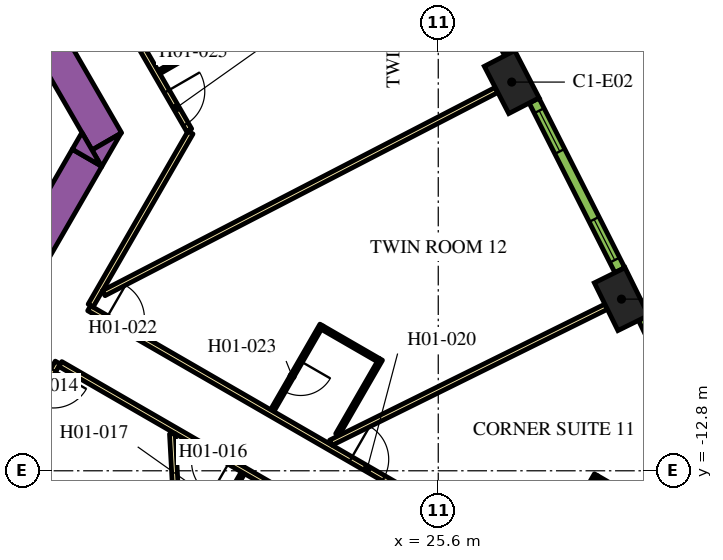
"""IFC4 building model, lengths in metres.
Left out: names, types, materials, properties, quantities, classifications, styles, units other than length and angle.
Written with IfcOpenShell. Run it as: python <this file> out.ifc"""

import sys

from ifc_helpers import new_model, si_unit, direction, frame, frame_2d, origin, origin_2d, place, context, subcontext, project, spatial, polyline, rectangle, outline, extrude, element, fill, save


model = new_model("IFC4")
c1 = context("Model", 3, precision=1e-05, world=origin(), true_north=direction((0.0, 1.0)))
c2 = subcontext(c1, "Body", "Model", "MODEL_VIEW")
j1 = project(units=[si_unit("LENGTHUNIT", "METRE"), si_unit("PLANEANGLEUNIT", "RADIAN")], contexts=[c1])
p1 = place(None, origin())
s1 = spatial("IfcSite", under=j1, at=p1, CompositionType="ELEMENT")
p2 = place(p1, origin())
s2 = spatial("IfcBuilding", under=s1, at=p2, CompositionType="ELEMENT")
p3 = place(p2, frame((0.0, 0.0, 35.4)))
s3 = spatial("IfcBuildingStorey", under=s2, at=p3, CompositionType="ELEMENT", Elevation=35.4)
for number, where, z_axis, x_axis in (
    (1, (30.421, -8.284, 0.0), (0.0, 0.0, 1.0), (-0.443, 0.897, 0.0)),
    (2, (27.533, -2.572, 0.0), (0.0, 0.0, 1.0), (-0.459, 0.888, 0.0)),
):
    element("IfcColumn", number, at=place(p3, frame(where, z_axis=z_axis, x_axis=x_axis)), inside=s3, PredefinedType="COLUMN", context=c2, shape_type="SweptSolid", body=[
        extrude(rectangle(XDim=1.4, YDim=0.9, at=origin_2d()), origin(), (0.0, 0.0, 1.0), 3.9),
    ])
p4 = place(p3, frame((6.711, 13.476, 0.0), z_axis=(0.0, 0.0, 1.0), x_axis=(0.500002723396, -0.866023831425, 0.0)))
e3 = element("IfcWall", 3, at=p4, inside=s3, PredefinedType="SOLIDWALL", context=c2, shape_type="SweptSolid", body=[
    extrude(rectangle(XDim=20.334, YDim=0.9, at=frame_2d((10.167, 0.0))), origin(), (0.0, 0.0, 1.0), 3.9),
])
p5 = place(p3, origin())
e4 = element("IfcWall", 4, at=p5, inside=s3, PredefinedType="SOLIDWALL", context=c2, shape_type="SweptSolid", body=[
    extrude(outline(polyline([(16.743, -4.8), (16.489, -4.36), (17.251, -3.92), (16.743, -4.8)])), origin(), (0.0, 0.0, 1.0), 3.9),
])
p6 = place(p3, frame((11.695, -12.644, 0.0), z_axis=(0.0, 0.0, 1.0), x_axis=(0.500010229568, 0.86601949766, 0.0)))
e5 = element("IfcWall", 5, at=p6, inside=s3, PredefinedType="SOLIDWALL", context=c2, shape_type="SweptSolid", body=[
    extrude(rectangle(XDim=9.326, YDim=0.9, at=frame_2d((4.663, 0.0))), origin(), (0.0, 0.0, 1.0), 3.9),
])
e6 = element("IfcWall", 6, at=p5, inside=s3, PredefinedType="SOLIDWALL", context=c2, shape_type="SweptSolid", body=[
    extrude(outline(polyline([(16.223, -3.9), (16.732, -4.78), (15.969, -4.34), (16.223, -3.9)])), origin(), (0.0, 0.0, 1.0), 3.9),
])
p7 = place(p3, frame((16.412, -8.523, 0.0), z_axis=(0.0, 0.0, 1.0), x_axis=(0.866022197818, -0.500005552856, 0.0)))
e7 = element("IfcWall", 7, at=p7, inside=s3, PredefinedType="PARTITIONING", context=c2, shape_type="SweptSolid", body=[
    extrude(rectangle(XDim=16.224, YDim=0.15, at=frame_2d((8.112, 0.0))), origin(), (0.0, 0.0, 1.0), 2.75),
])
p8 = place(p7, frame((7.949, 0.0, 0.0)))
e8 = element("IfcOpeningElement", 8, at=p8, cuts=e7, PredefinedType="OPENING", context=c2, shape_type="SweptSolid", body=[
    extrude(rectangle(XDim=1.0, YDim=2.1, at=frame_2d((0.5, 1.05))), frame((0.0, 0.085, 0.0), z_axis=(0.0, -1.0, 0.0), x_axis=(1.0, 0.0, 0.0)), (0.0, 0.0, 1.0), 0.17),
])
p9 = place(p7, frame((0.526, 0.0, 0.0)))
e9 = element("IfcOpeningElement", 9, at=p9, cuts=e7, PredefinedType="OPENING", context=c2, shape_type="SweptSolid", body=[
    extrude(rectangle(XDim=1.0, YDim=2.1, at=frame_2d((0.5, 1.05))), frame((0.0, 0.085, 0.0), z_axis=(0.0, -1.0, 0.0), x_axis=(1.0, 0.0, 0.0)), (0.0, 0.0, 1.0), 0.17),
])
p10 = place(p3, frame((19.081, -3.9, 0.0), z_axis=(0.0, 0.0, 1.0), x_axis=(-0.499974327079, -0.866040225545, 0.0)))
e10 = element("IfcWall", 10, at=p10, inside=s3, PredefinedType="PARTITIONING", context=c2, shape_type="SweptSolid", body=[
    extrude(rectangle(XDim=5.258, YDim=0.15, at=frame_2d((2.629, 0.0))), origin(), (0.0, 0.0, 1.0), 2.75),
])
p11 = place(p3, frame((6.163, 18.475, 0.0), z_axis=(0.0, 0.0, 1.0), x_axis=(0.500001317485, -0.866024643133, 0.0)))
e11 = element("IfcWall", 11, at=p11, inside=s3, PredefinedType="PARTITIONING", context=c2, shape_type="SweptSolid", body=[
    extrude(rectangle(XDim=25.767, YDim=0.15, at=frame_2d((12.883, 0.0))), origin(), (0.0, 0.0, 1.0), 2.75),
])
p12 = place(p11, frame((24.586, 0.0, 0.0)))
e12 = element("IfcOpeningElement", 12, at=p12, cuts=e11, PredefinedType="OPENING", context=c2, shape_type="SweptSolid", body=[
    extrude(rectangle(XDim=1.0, YDim=2.1, at=frame_2d((0.5, 1.05))), frame((0.0, 0.085, 0.0), z_axis=(0.0, -1.0, 0.0), x_axis=(1.0, 0.0, 0.0)), (0.0, 0.0, 1.0), 0.17),
])
p13 = place(p11, frame((19.319, 0.0, 0.0)))
e13 = element("IfcOpeningElement", 13, at=p13, cuts=e11, PredefinedType="OPENING", context=c2, shape_type="SweptSolid", body=[
    extrude(rectangle(XDim=1.0, YDim=2.1, at=frame_2d((0.5, 1.05))), frame((0.0, 0.085, 0.0), z_axis=(0.0, -1.0, 0.0), x_axis=(1.0, 0.0, 0.0)), (0.0, 0.0, 1.0), 0.17),
])
p14 = place(p11, frame((18.012, 0.0, 0.0)))
e14 = element("IfcOpeningElement", 14, at=p14, cuts=e11, PredefinedType="OPENING", context=c2, shape_type="SweptSolid", body=[
    extrude(rectangle(XDim=1.0, YDim=2.1, at=frame_2d((0.5, 1.05))), frame((0.0, 0.085, 0.0), z_axis=(0.0, -1.0, 0.0), x_axis=(1.0, 0.0, 0.0)), (0.0, 0.0, 1.0), 0.17),
])
p15 = place(p11, frame((6.824, 0.0, 0.0)))
e15 = element("IfcOpeningElement", 15, at=p15, cuts=e11, PredefinedType="OPENING", context=c2, shape_type="SweptSolid", body=[
    extrude(rectangle(XDim=1.1, YDim=2.1, at=frame_2d((0.55, 1.05))), frame((0.0, 0.085, 0.0), z_axis=(0.0, -1.0, 0.0), x_axis=(1.0, 0.0, 0.0)), (0.0, 0.0, 1.0), 0.17),
])
p16 = place(p11, frame((4.658, 0.0, 0.0)))
e16 = element("IfcOpeningElement", 16, at=p16, cuts=e11, PredefinedType="OPENING", context=c2, shape_type="SweptSolid", body=[
    extrude(rectangle(XDim=0.9, YDim=2.1, at=frame_2d((0.45, 1.05))), frame((0.0, 0.085, 0.0), z_axis=(0.0, -1.0, 0.0), x_axis=(1.0, 0.0, 0.0)), (0.0, 0.0, 1.0), 0.17),
])
p17 = place(p11, frame((0.18, 0.0, 0.0)))
e17 = element("IfcOpeningElement", 17, at=p17, cuts=e11, PredefinedType="OPENING", context=c2, shape_type="SweptSolid", body=[
    extrude(rectangle(XDim=1.0, YDim=2.1, at=frame_2d((0.5, 1.05))), frame((0.0, 0.085, 0.0), z_axis=(0.0, -1.0, 0.0), x_axis=(1.0, 0.0, 0.0)), (0.0, 0.0, 1.0), 0.17),
])
p18 = place(p3, frame((15.587, -9.952, 0.0), z_axis=(0.0, 0.0, 1.0), x_axis=(-0.500016618951, -0.866015808616, 0.0)))
e18 = element("IfcWall", 18, at=p18, inside=s3, PredefinedType="PARTITIONING", context=c2, shape_type="SweptSolid", body=[
    extrude(rectangle(XDim=5.268, YDim=0.15, at=frame_2d((2.634, 0.0))), origin(), (0.0, 0.0, 1.0), 2.75),
])
p19 = place(p18, frame((0.225, 0.0, 0.0)))
e19 = element("IfcOpeningElement", 19, at=p19, cuts=e18, PredefinedType="OPENING", context=c2, shape_type="SweptSolid", body=[
    extrude(rectangle(XDim=1.0, YDim=2.1, at=frame_2d((0.5, 1.05))), frame((0.0, 0.085, 0.0), z_axis=(0.0, -1.0, 0.0), x_axis=(1.0, 0.0, 0.0)), (0.0, 0.0, 1.0), 0.17),
])
p20 = place(p3, frame((29.638, -18.064, 0.0), z_axis=(0.0, 0.0, 1.0), x_axis=(-0.866026175601, 0.499998663172, 0.0)))
e20 = element("IfcWall", 20, at=p20, inside=s3, PredefinedType="PARTITIONING", context=c2, shape_type="SweptSolid", body=[
    extrude(rectangle(XDim=16.144, YDim=0.15, at=frame_2d((8.072, 0.0))), origin(), (0.0, 0.0, 1.0), 2.75),
])
p21 = place(p20, frame((11.004, 0.0, 0.0)))
e21 = element("IfcOpeningElement", 21, at=p21, cuts=e20, PredefinedType="OPENING", context=c2, shape_type="SweptSolid", body=[
    extrude(rectangle(XDim=1.0, YDim=2.1, at=frame_2d((0.5, 1.05))), frame((0.0, 0.085, 0.0), z_axis=(0.0, -1.0, 0.0), x_axis=(1.0, 0.0, 0.0)), (0.0, 0.0, 1.0), 0.17),
])
p22 = place(p20, frame((7.275, 0.0, 0.0)))
e22 = element("IfcOpeningElement", 22, at=p22, cuts=e20, PredefinedType="OPENING", context=c2, shape_type="SweptSolid", body=[
    extrude(rectangle(XDim=1.0, YDim=2.1, at=frame_2d((0.5, 1.05))), frame((0.0, 0.085, 0.0), z_axis=(0.0, -1.0, 0.0), x_axis=(1.0, 0.0, 0.0)), (0.0, 0.0, 1.0), 0.17),
])
p23 = place(p3, frame((27.134, -2.779, 0.0), z_axis=(0.0, 0.0, 1.0), x_axis=(-0.8882049501, -0.459447457951, 0.0)))
e23 = element("IfcWall", 23, at=p23, inside=s3, PredefinedType="PARTITIONING", context=c2, shape_type="SweptSolid", body=[
    extrude(rectangle(XDim=11.638, YDim=0.15, at=frame_2d((5.819, 0.0))), origin(), (0.0, 0.0, 1.0), 2.75),
])
p24 = place(p3, frame((19.198, -22.541, 0.0), z_axis=(0.0, 0.0, 1.0), x_axis=(-0.055432210572, 0.99846245299, 0.0)))
e24 = element("IfcWall", 24, at=p24, inside=s3, PredefinedType="PARTITIONING", context=c2, shape_type="SweptSolid", body=[
    extrude(rectangle(XDim=10.729, YDim=0.15, at=frame_2d((5.365, 0.0))), origin(), (0.0, 0.0, 1.0), 2.75),
])
p25 = place(p3, frame((30.018, -8.483, 0.0), z_axis=(0.0, 0.0, 1.0), x_axis=(-0.896544505264, -0.44295366584, 0.0)))
e25 = element("IfcWall", 25, at=p25, inside=s3, PredefinedType="PARTITIONING", context=c2, shape_type="SweptSolid", body=[
    extrude(rectangle(XDim=8.079, YDim=0.15, at=frame_2d((4.04, 0.0))), origin(), (0.0, 0.0, 1.0), 2.75),
])
p26 = place(p3, frame((16.16, -14.31, 0.0), z_axis=(0.0, 0.0, 1.0), x_axis=(-0.866062058628, 0.499936506574, 0.0)))
e26 = element("IfcWall", 26, at=p26, inside=s3, PredefinedType="PARTITIONING", context=c2, shape_type="SweptSolid", body=[
    extrude(rectangle(XDim=2.6, YDim=0.1, at=frame_2d((1.3, 0.0))), origin(), (0.0, 0.0, 1.0), 2.75),
])
p27 = place(p26, frame((1.1, 0.0, 0.0)))
e27 = element("IfcOpeningElement", 27, at=p27, cuts=e26, PredefinedType="OPENING", context=c2, shape_type="SweptSolid", body=[
    extrude(rectangle(XDim=0.9, YDim=2.1, at=frame_2d((0.45, 1.05))), frame((0.0, 0.06, 0.0), z_axis=(0.0, -1.0, 0.0), x_axis=(1.0, 0.0, 0.0)), (0.0, 0.0, 1.0), 0.12),
])
p28 = place(p3, frame((20.461, -12.852, 0.0), z_axis=(0.0, 0.0, 1.0), x_axis=(-0.49997559174, -0.866039495442, 0.0)))
e28 = element("IfcWall", 28, at=p28, inside=s3, PredefinedType="PARTITIONING", context=c2, shape_type="SweptSolid", body=[
    extrude(rectangle(XDim=2.95, YDim=0.1, at=frame_2d((1.475, 0.0))), origin(), (0.0, 0.0, 1.0), 2.75),
])
p29 = place(p28, frame((0.6, 0.0, 0.0)))
e29 = element("IfcOpeningElement", 29, at=p29, cuts=e28, PredefinedType="OPENING", context=c2, shape_type="SweptSolid", body=[
    extrude(rectangle(XDim=0.9, YDim=2.1, at=frame_2d((0.45, 1.05))), frame((0.0, 0.06, 0.0), z_axis=(0.0, -1.0, 0.0), x_axis=(1.0, 0.0, 0.0)), (0.0, 0.0, 1.0), 0.12),
])
p30 = place(p3, frame((29.752, -12.905, 0.0), z_axis=(0.0, 0.0, 1.0), x_axis=(-0.500049511043, -0.865996816683, 0.0)))
e30 = element("IfcWall", 30, at=p30, inside=s3, PredefinedType="PARTITIONING", context=c2, shape_type="SweptSolid", body=[
    extrude(rectangle(XDim=2.8, YDim=0.1, at=frame_2d((1.4, 0.0))), origin(), (0.0, 0.0, 1.0), 2.75),
])
p31 = place(p30, frame((1.3, 0.0, 0.0)))
e31 = element("IfcOpeningElement", 31, at=p31, cuts=e30, PredefinedType="OPENING", context=c2, shape_type="SweptSolid", body=[
    extrude(rectangle(XDim=0.9, YDim=2.1, at=frame_2d((0.45, 1.05))), frame((0.0, 0.06, 0.0), z_axis=(0.0, -1.0, 0.0), x_axis=(1.0, 0.0, 0.0)), (0.0, 0.0, 1.0), 0.12),
])
p32 = place(p3, frame((29.771, -12.973, 0.0), z_axis=(0.0, 0.0, 1.0), x_axis=(0.865980596518, -0.500077600433, 0.0)))
e32 = element("IfcWall", 32, at=p32, inside=s3, PredefinedType="PARTITIONING", context=c2, shape_type="SweptSolid", body=[
    extrude(rectangle(XDim=2.4, YDim=0.1, at=frame_2d((1.2, 0.0))), origin(), (0.0, 0.0, 1.0), 2.75),
])
p33 = place(p3, frame((22.53, -8.966, 0.0), z_axis=(0.0, 0.0, 1.0), x_axis=(-0.500006934395, -0.866021400173, 0.0)))
e33 = element("IfcWall", 33, at=p33, inside=s3, PredefinedType="PARTITIONING", context=c2, shape_type="SweptSolid", body=[
    extrude(rectangle(XDim=2.6, YDim=0.1, at=frame_2d((1.3, 0.0))), origin(), (0.0, 0.0, 1.0), 2.75),
])
p34 = place(p33, frame((1.1, 0.0, 0.0)))
e34 = element("IfcOpeningElement", 34, at=p34, cuts=e33, PredefinedType="OPENING", context=c2, shape_type="SweptSolid", body=[
    extrude(rectangle(XDim=0.9, YDim=2.1, at=frame_2d((0.45, 1.05))), frame((0.0, 0.06, 0.0), z_axis=(0.0, -1.0, 0.0), x_axis=(1.0, 0.0, 0.0)), (0.0, 0.0, 1.0), 0.12),
])
p35 = place(p3, frame((22.549, -9.035, 0.0), z_axis=(0.0, 0.0, 1.0), x_axis=(0.86605165483, -0.499954529098, 0.0)))
e35 = element("IfcWall", 35, at=p35, inside=s3, PredefinedType="PARTITIONING", context=c2, shape_type="SweptSolid", body=[
    extrude(rectangle(XDim=1.7, YDim=0.1, at=frame_2d((0.85, 0.0))), origin(), (0.0, 0.0, 1.0), 2.75),
])
p36 = place(p3, frame((22.944, -11.85, 0.0), z_axis=(0.0, 0.0, 1.0), x_axis=(0.499968531483, 0.866043571379, 0.0)))
e36 = element("IfcWall", 36, at=p36, inside=s3, PredefinedType="PARTITIONING", context=c2, shape_type="SweptSolid", body=[
    extrude(rectangle(XDim=2.29, YDim=0.1, at=frame_2d((1.145, 0.0))), origin(), (0.0, 0.0, 1.0), 2.75),
])
p37 = place(p3, frame((18.25, -2.311, 0.0), z_axis=(0.0, 0.0, 1.0), x_axis=(0.866021400173, 0.500006934395, 0.0)))
e37 = element("IfcWall", 37, at=p37, inside=s3, PredefinedType="PARTITIONING", context=c2, shape_type="SweptSolid", body=[
    extrude(rectangle(XDim=2.6, YDim=0.1, at=frame_2d((1.3, 0.0))), origin(), (0.0, 0.0, 1.0), 2.75),
])
p38 = place(p37, frame((0.6, 0.0, 0.0)))
e38 = element("IfcOpeningElement", 38, at=p38, cuts=e37, PredefinedType="OPENING", context=c2, shape_type="SweptSolid", body=[
    extrude(rectangle(XDim=0.9, YDim=2.1, at=frame_2d((0.45, 1.05))), frame((0.0, 0.06, 0.0), z_axis=(0.0, -1.0, 0.0), x_axis=(1.0, 0.0, 0.0)), (0.0, 0.0, 1.0), 0.12),
])
p39 = place(p3, frame((33.176, -13.29, 0.0), z_axis=(0.0, 0.0, 1.0), x_axis=(-0.434664499056, 0.900592456808, 0.0)))
e39 = element("IfcWall", 39, at=p39, inside=s3, PredefinedType="SOLIDWALL", context=c2, shape_type="SweptSolid", body=[
    extrude(rectangle(XDim=5.006, YDim=0.29, at=frame_2d((2.503, 0.0))), origin(), (0.0, 0.0, 1.0), 3.65),
])
p40 = place(p39, frame((0.265, 0.0, 0.9)))
e40 = element("IfcOpeningElement", 40, at=p40, cuts=e39, PredefinedType="OPENING", context=c2, shape_type="SweptSolid", body=[
    extrude(rectangle(XDim=1.2, YDim=2.15, at=frame_2d((0.6, 1.075))), frame((0.0, 0.155, 0.0), z_axis=(0.0, -1.0, 0.0), x_axis=(1.0, 0.0, 0.0)), (0.0, 0.0, 1.0), 0.31),
])
p41 = place(p39, frame((3.496, 0.0, 0.9)))
e41 = element("IfcOpeningElement", 41, at=p41, cuts=e39, PredefinedType="OPENING", context=c2, shape_type="SweptSolid", body=[
    extrude(rectangle(XDim=1.2, YDim=2.15, at=frame_2d((0.6, 1.075))), frame((0.0, 0.155, 0.0), z_axis=(0.0, -1.0, 0.0), x_axis=(1.0, 0.0, 0.0)), (0.0, 0.0, 1.0), 0.31),
])
p42 = place(p3, frame((30.377, -7.521, 0.0), z_axis=(0.0, 0.0, 1.0), x_axis=(-0.451233929645, 0.892405704115, 0.0)))
e42 = element("IfcWall", 42, at=p42, inside=s3, PredefinedType="SOLIDWALL", context=c2, shape_type="SweptSolid", body=[
    extrude(rectangle(XDim=4.998, YDim=0.29, at=frame_2d((2.499, 0.0))), origin(), (0.0, 0.0, 1.0), 3.65),
])
p43 = place(p42, frame((0.297, 0.0, 0.9)))
e43 = element("IfcOpeningElement", 43, at=p43, cuts=e42, PredefinedType="OPENING", context=c2, shape_type="SweptSolid", body=[
    extrude(rectangle(XDim=1.2, YDim=2.15, at=frame_2d((0.6, 1.075))), frame((0.0, 0.155, 0.0), z_axis=(0.0, -1.0, 0.0), x_axis=(1.0, 0.0, 0.0)), (0.0, 0.0, 1.0), 0.31),
])
p44 = place(p42, frame((3.501, 0.0, 0.9)))
e44 = element("IfcOpeningElement", 44, at=p44, cuts=e42, PredefinedType="OPENING", context=c2, shape_type="SweptSolid", body=[
    extrude(rectangle(XDim=1.2, YDim=2.15, at=frame_2d((0.6, 1.075))), frame((0.0, 0.155, 0.0), z_axis=(0.0, -1.0, 0.0), x_axis=(1.0, 0.0, 0.0)), (0.0, 0.0, 1.0), 0.31),
])
p45 = place(p3, frame((27.475, -1.81, 0.0), z_axis=(0.0, 0.0, 1.0), x_axis=(-0.467629620899, 0.883924509026, 0.0)))
e45 = element("IfcWall", 45, at=p45, inside=s3, PredefinedType="SOLIDWALL", context=c2, shape_type="SweptSolid", body=[
    extrude(rectangle(XDim=4.998, YDim=0.29, at=frame_2d((2.499, 0.0))), origin(), (0.0, 0.0, 1.0), 3.65),
])
p46 = place(p45, frame((0.297, 0.0, 0.9)))
e46 = element("IfcOpeningElement", 46, at=p46, cuts=e45, PredefinedType="OPENING", context=c2, shape_type="SweptSolid", body=[
    extrude(rectangle(XDim=1.2, YDim=2.15, at=frame_2d((0.6, 1.075))), frame((0.0, 0.155, 0.0), z_axis=(0.0, -1.0, 0.0), x_axis=(1.0, 0.0, 0.0)), (0.0, 0.0, 1.0), 0.31),
])
p47 = place(p45, frame((3.501, 0.0, 0.9)))
e47 = element("IfcOpeningElement", 47, at=p47, cuts=e45, PredefinedType="OPENING", context=c2, shape_type="SweptSolid", body=[
    extrude(rectangle(XDim=1.2, YDim=2.15, at=frame_2d((0.6, 1.075))), frame((0.0, 0.155, 0.0), z_axis=(0.0, -1.0, 0.0), x_axis=(1.0, 0.0, 0.0)), (0.0, 0.0, 1.0), 0.31),
])
p48 = place(p19, origin())
e48 = element("IfcDoor", 48, at=p48, inside=s3, OperationType="SINGLE_SWING_LEFT", PredefinedType="DOOR", context=c2, shape_type="SweptSolid", body=[
    extrude(rectangle(XDim=1.0, YDim=2.1, at=frame_2d((0.5, 1.05))), frame((0.0, 0.025, 0.0), z_axis=(0.0, -1.0, 0.0), x_axis=(1.0, 0.0, 0.0)), (0.0, 0.0, 1.0), 0.05),
])
fill(e19, e48)
p49 = place(p21, origin())
e49 = element("IfcDoor", 49, at=p49, inside=s3, OperationType="SINGLE_SWING_RIGHT", PredefinedType="DOOR", context=c2, shape_type="SweptSolid", body=[
    extrude(rectangle(XDim=1.0, YDim=2.1, at=frame_2d((0.5, 1.05))), frame((0.0, 0.025, 0.0), z_axis=(0.0, -1.0, 0.0), x_axis=(1.0, 0.0, 0.0)), (0.0, 0.0, 1.0), 0.05),
])
fill(e21, e49)
p50 = place(p8, origin())
e50 = element("IfcDoor", 50, at=p50, inside=s3, OperationType="SINGLE_SWING_LEFT", PredefinedType="DOOR", context=c2, shape_type="SweptSolid", body=[
    extrude(rectangle(XDim=1.0, YDim=2.1, at=frame_2d((0.5, 1.05))), frame((0.0, 0.025, 0.0), z_axis=(0.0, -1.0, 0.0), x_axis=(1.0, 0.0, 0.0)), (0.0, 0.0, 1.0), 0.05),
])
fill(e8, e50)
p51 = place(p9, origin())
e51 = element("IfcDoor", 51, at=p51, inside=s3, OperationType="SINGLE_SWING_LEFT", PredefinedType="DOOR", context=c2, shape_type="SweptSolid", body=[
    extrude(rectangle(XDim=1.0, YDim=2.1, at=frame_2d((0.5, 1.05))), frame((0.0, 0.025, 0.0), z_axis=(0.0, -1.0, 0.0), x_axis=(1.0, 0.0, 0.0)), (0.0, 0.0, 1.0), 0.05),
])
fill(e9, e51)
p52 = place(p34, origin())
e52 = element("IfcDoor", 52, at=p52, inside=s3, OperationType="SINGLE_SWING_RIGHT", PredefinedType="DOOR", context=c2, shape_type="SweptSolid", body=[
    extrude(rectangle(XDim=0.9, YDim=2.1, at=frame_2d((0.45, 1.05))), frame((0.0, 0.025, 0.0), z_axis=(0.0, -1.0, 0.0), x_axis=(1.0, 0.0, 0.0)), (0.0, 0.0, 1.0), 0.05),
])
fill(e34, e52)
p53 = place(p12, origin())
e53 = element("IfcDoor", 53, at=p53, inside=s3, OperationType="SINGLE_SWING_RIGHT", PredefinedType="DOOR", context=c2, shape_type="SweptSolid", body=[
    extrude(rectangle(XDim=1.0, YDim=2.1, at=frame_2d((0.5, 1.05))), frame((0.0, 0.025, 0.0), z_axis=(0.0, -1.0, 0.0), x_axis=(1.0, 0.0, 0.0)), (0.0, 0.0, 1.0), 0.05),
])
fill(e12, e53)
p54 = place(p38, origin())
e54 = element("IfcDoor", 54, at=p54, inside=s3, OperationType="SINGLE_SWING_LEFT", PredefinedType="DOOR", context=c2, shape_type="SweptSolid", body=[
    extrude(rectangle(XDim=0.9, YDim=2.1, at=frame_2d((0.45, 1.05))), frame((0.0, 0.025, 0.0), z_axis=(0.0, -1.0, 0.0), x_axis=(1.0, 0.0, 0.0)), (0.0, 0.0, 1.0), 0.05),
])
fill(e38, e54)
p55 = place(p43, origin())
e55 = element("IfcWindow", 55, at=p55, inside=s3, PartitioningType="DOUBLE_PANEL_VERTICAL", PredefinedType="WINDOW", context=c2, shape_type="SweptSolid", body=[
    extrude(rectangle(XDim=1.2, YDim=2.15, at=frame_2d((0.6, 1.075))), frame((0.0, 0.015, 0.0), z_axis=(0.0, -1.0, 0.0), x_axis=(1.0, 0.0, 0.0)), (0.0, 0.0, 1.0), 0.06),
])
fill(e43, e55)
p56 = place(p44, origin())
e56 = element("IfcWindow", 56, at=p56, inside=s3, PartitioningType="DOUBLE_PANEL_VERTICAL", PredefinedType="WINDOW", context=c2, shape_type="SweptSolid", body=[
    extrude(rectangle(XDim=1.2, YDim=2.15, at=frame_2d((0.6, 1.075))), frame((0.0, 0.015, 0.0), z_axis=(0.0, -1.0, 0.0), x_axis=(1.0, 0.0, 0.0)), (0.0, 0.0, 1.0), 0.06),
])
fill(e44, e56)
save(model, sys.argv[1])
